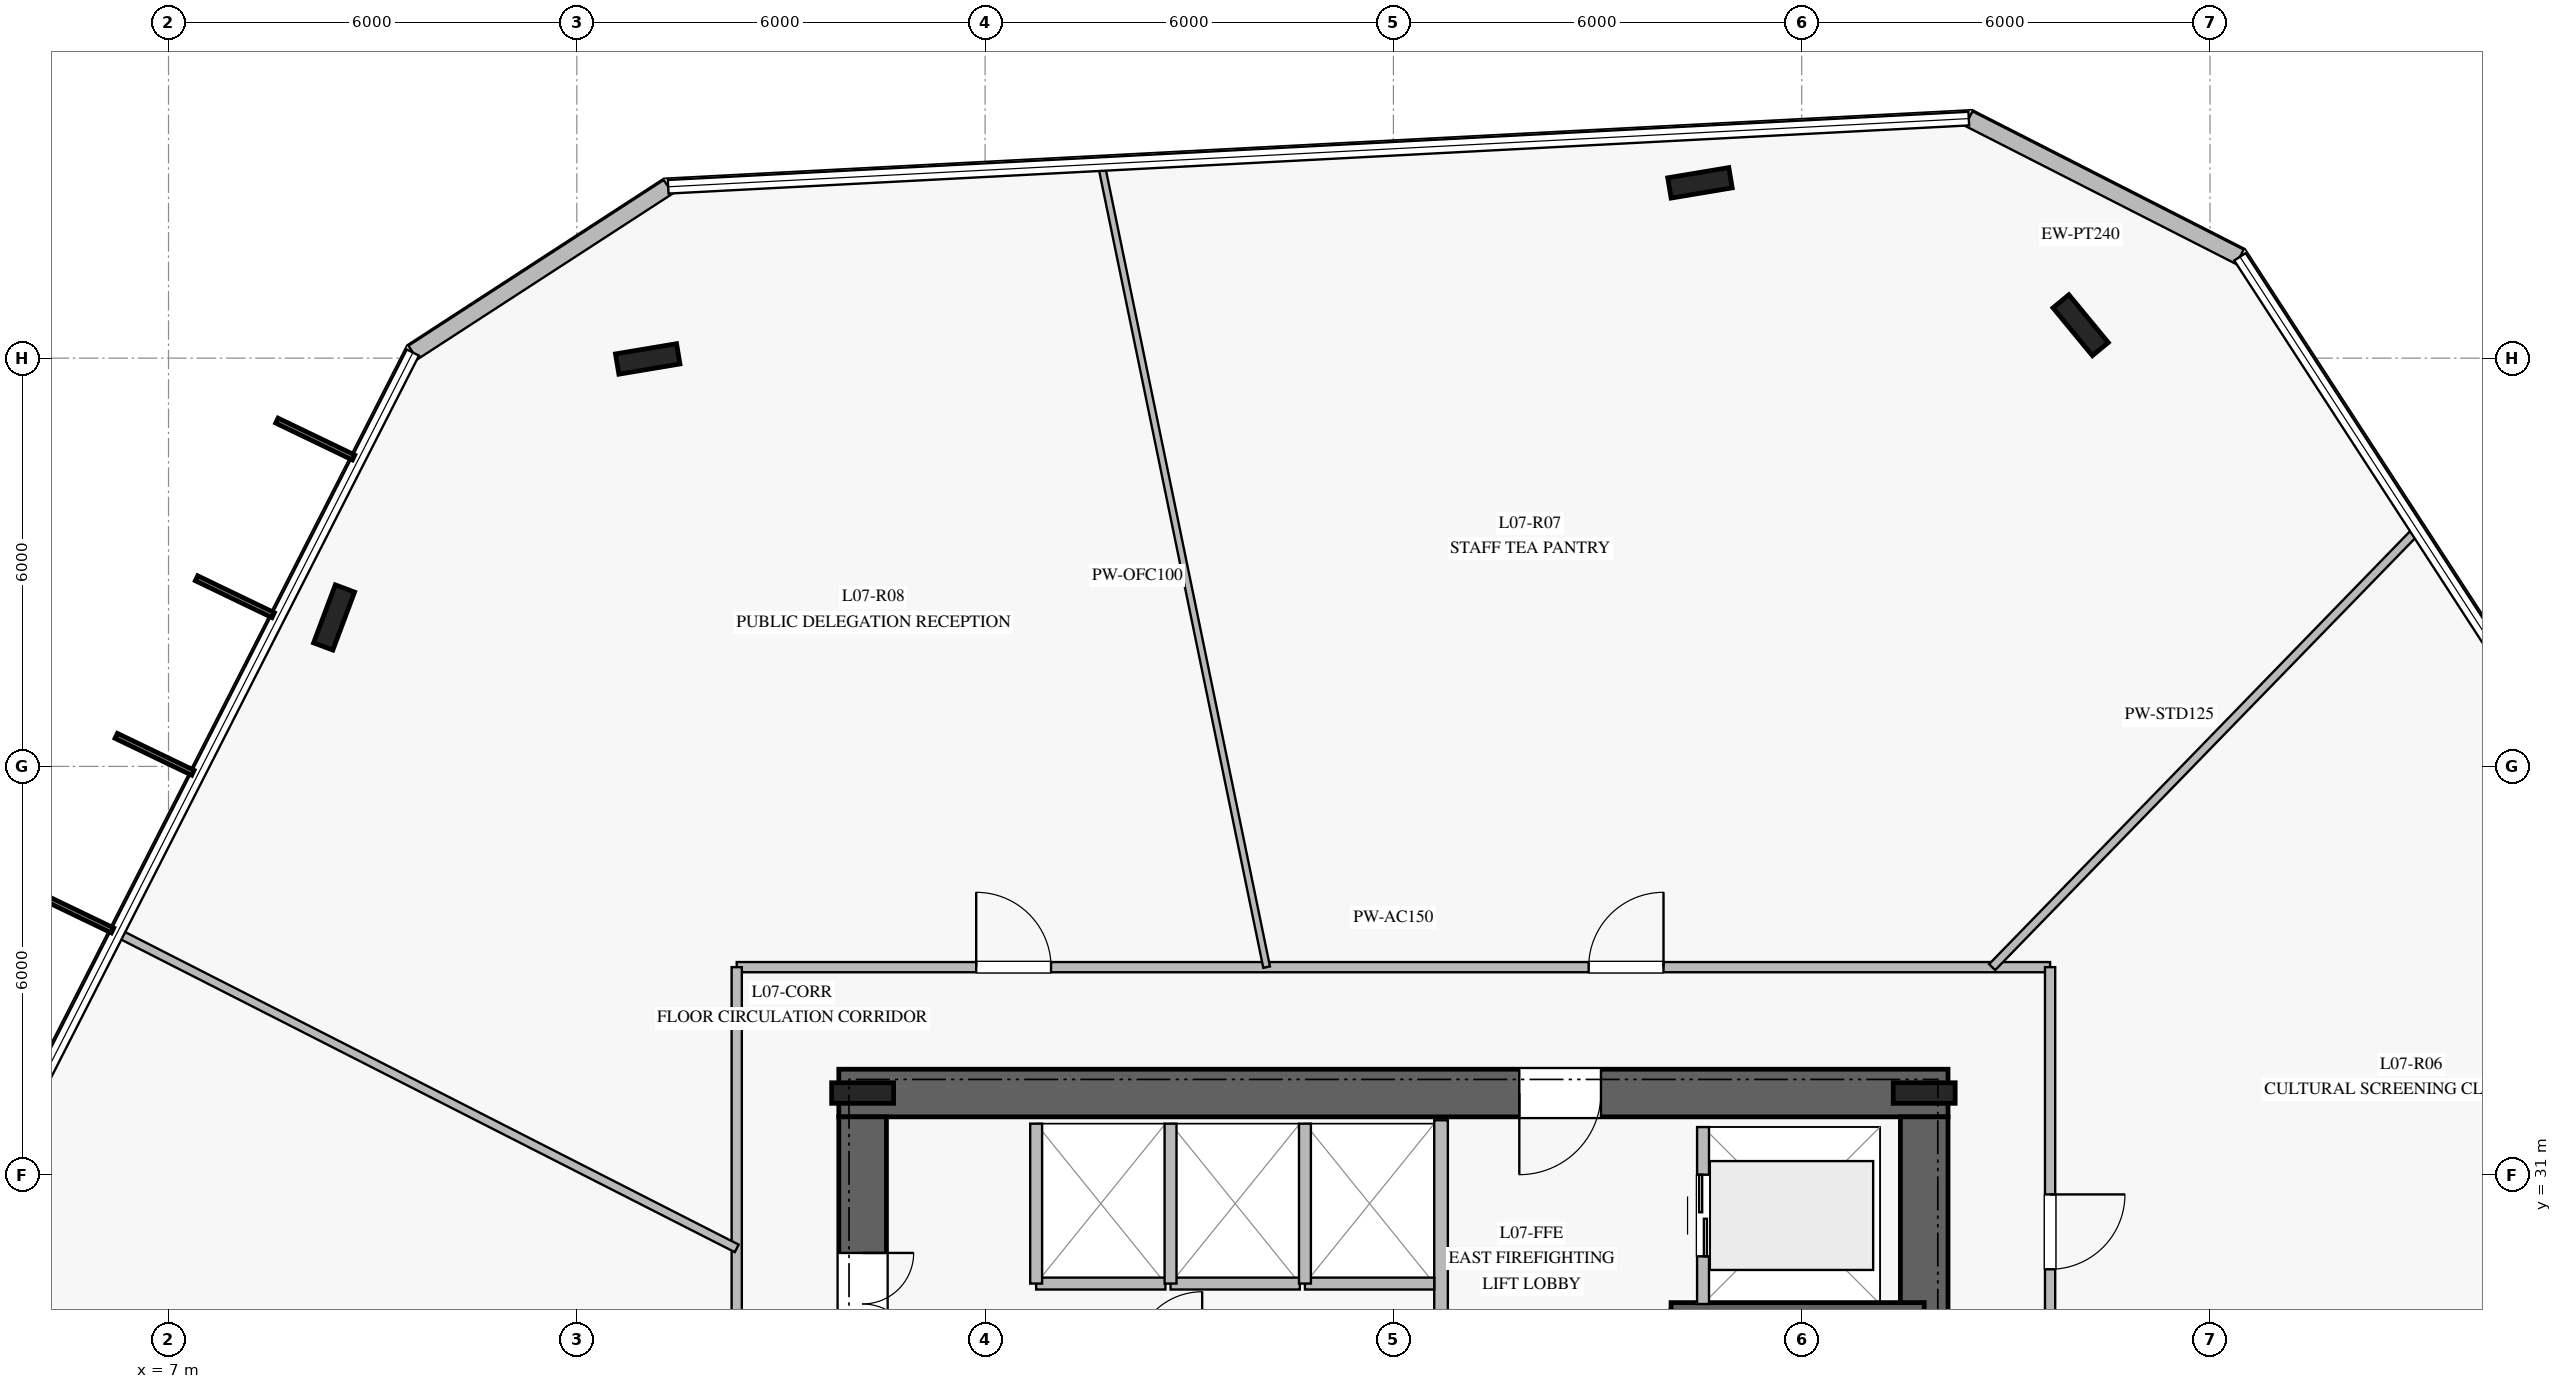
"""IFC4 building model, lengths in metres.
Left out: names, types, materials, properties, quantities, classifications, styles, units other than length and angle.
Written with IfcOpenShell. Run it as: python <this file> out.ifc"""

import sys

from ifc_helpers import new_model, si_unit, direction, frame, frame_2d, origin, origin_2d, place, context, subcontext, project, spatial, rectangle, i_section, extrude, element, fill, save


model = new_model("IFC4")
c1 = context("Model", 3, precision=1e-05, world=origin(), true_north=direction((0.0, 1.0)))
c2 = subcontext(c1, "Body", "Model", "MODEL_VIEW")
j1 = project(units=[si_unit("LENGTHUNIT", "METRE"), si_unit("PLANEANGLEUNIT", "RADIAN")], contexts=[c1])
p1 = place(None, origin())
s1 = spatial("IfcSite", under=j1, at=p1, CompositionType="ELEMENT")
p2 = place(p1, origin())
s2 = spatial("IfcBuilding", under=s1, at=p2, CompositionType="ELEMENT")
p3 = place(p2, frame((0.0, 0.0, 32.0)))
s3 = spatial("IfcBuildingStorey", under=s2, at=p3, CompositionType="ELEMENT", Elevation=32.0)
p4 = place(p3, frame((33.15, 32.2, 0.0), z_axis=(0.0, 0.0, 1.0), x_axis=(-1.0, 0.0, 0.0)))
e1 = element("IfcWall", 1, at=p4, inside=s3, PredefinedType="SHEAR", context=c2, shape_type="SweptSolid", body=[
    extrude(rectangle(XDim=16.3, YDim=0.7, at=frame_2d((8.15, 0.0))), origin(), (0.0, 0.0, 1.0), 3.76),
])
p5 = place(p4, frame((5.1, 0.0, 0.0)))
e2 = element("IfcOpeningElement", 2, at=p5, cuts=e1, PredefinedType="OPENING", context=c2, shape_type="SweptSolid", body=[
    extrude(rectangle(XDim=1.2, YDim=2.25, at=frame_2d((0.6, 1.125))), frame((0.0, 0.36, 0.0), z_axis=(0.0, -1.0, 0.0), x_axis=(1.0, 0.0, 0.0)), (0.0, 0.0, 1.0), 0.72),
])
p6 = place(p3, frame((17.2, 31.85, 0.0), z_axis=(0.0, 0.0, 1.0), x_axis=(0.0, -1.0, 0.0)))
e3 = element("IfcWall", 3, at=p6, inside=s3, PredefinedType="SHEAR", context=c2, shape_type="SweptSolid", body=[
    extrude(rectangle(XDim=13.7, YDim=0.7, at=frame_2d((6.85, 0.0))), origin(), (0.0, 0.0, 1.0), 3.76),
])
p7 = place(p6, frame((2.0, 0.0, 0.0)))
e4 = element("IfcOpeningElement", 4, at=p7, cuts=e3, PredefinedType="OPENING", context=c2, shape_type="SweptSolid", body=[
    extrude(rectangle(XDim=1.5, YDim=2.2, at=frame_2d((0.75, 1.1))), frame((0.0, 0.36, 0.0), z_axis=(0.0, -1.0, 0.0), x_axis=(1.0, 0.0, 0.0)), (0.0, 0.0, 1.0), 0.72),
])
p8 = place(p3, frame((32.8, 18.15, 0.0), z_axis=(0.0, 0.0, 1.0), x_axis=(0.0, 1.0, 0.0)))
e5 = element("IfcWall", 5, at=p8, inside=s3, PredefinedType="SHEAR", context=c2, shape_type="SweptSolid", body=[
    extrude(rectangle(XDim=13.7, YDim=0.7, at=frame_2d((6.85, 0.0))), origin(), (0.0, 0.0, 1.0), 3.76),
])
for number, where, z_axis, x_axis in (
    (6, (32.8, 32.2, 0.0), (0.0, 0.0, 1.0), (1.0, 0.0, 0.0)),
    (7, (17.2, 32.2, 0.0), (0.0, 0.0, 1.0), (1.0, 0.0, 0.0)),
):
    element("IfcColumn", number, at=place(p3, frame(where, z_axis=z_axis, x_axis=x_axis)), inside=s3, PredefinedType="COLUMN", context=c2, shape_type="SweptSolid", body=[
        extrude(i_section(OverallWidth=0.302, OverallDepth=0.91, WebThickness=0.021, FlangeThickness=0.04, at=origin_2d()), origin(), (0.0, 0.0, 1.0), 4.0),
    ])
p9 = place(p3, frame((29.08, 29.01, 0.0), z_axis=(0.0, 0.0, 1.0), x_axis=(1.0, 0.0, 0.0)))
e8 = element("IfcWall", 8, at=p9, inside=s3, PredefinedType="SOLIDWALL", context=c2, shape_type="SweptSolid", body=[
    extrude(rectangle(XDim=3.72, YDim=0.22, at=frame_2d((1.86, 0.0))), origin(), (0.0, 0.0, 1.0), 3.76),
])
for number, where, z_axis, x_axis in (
    (9, (35.099, 43.484, 0.0), (0.0, 0.0, 1.0), (-0.636, 0.772, 0.0)),
    (10, (29.505, 45.576, 0.0), (0.0, 0.0, 1.0), (0.986, 0.165, 0.0)),
    (11, (14.042, 42.988, 0.0), (0.0, 0.0, 1.0), (0.986, 0.165, 0.0)),
    (12, (9.433, 39.189, 0.0), (0.0, 0.0, 1.0), (0.35, 0.937, 0.0)),
):
    element("IfcColumn", number, at=place(p3, frame(where, z_axis=z_axis, x_axis=x_axis)), inside=s3, PredefinedType="COLUMN", context=c2, shape_type="SweptSolid", body=[
        extrude(i_section(OverallWidth=0.302, OverallDepth=0.91, WebThickness=0.021, FlangeThickness=0.04, at=origin_2d()), origin(), (0.0, 0.0, 1.0), 4.0),
    ])
p10 = place(p3, frame((37.44, 44.489, 0.0), z_axis=(0.0, 0.0, 1.0), x_axis=(-0.89095075078, 0.454099944599, 0.0)))
e13 = element("IfcWall", 13, at=p10, inside=s3, PredefinedType="STANDARD", context=c2, shape_type="SweptSolid", body=[
    extrude(rectangle(XDim=4.473, YDim=0.24, at=frame_2d((2.236, 0.0))), origin(), (0.0, 0.0, 1.0), 3.76),
])
p11 = place(p3, frame((14.343, 45.518, 0.0), z_axis=(0.0, 0.0, 1.0), x_axis=(-0.838722812153, -0.544558577542, 0.0)))
e14 = element("IfcWall", 14, at=p11, inside=s3, PredefinedType="STANDARD", context=c2, shape_type="SweptSolid", body=[
    extrude(rectangle(XDim=4.473, YDim=0.24, at=frame_2d((2.237, 0.0))), origin(), (0.0, 0.0, 1.0), 3.76),
])
p12 = place(p3, frame((25.7, 26.65, 0.0), z_axis=(0.0, 0.0, 1.0), x_axis=(0.0, 1.0, 0.0)))
e15 = element("IfcWall", 15, at=p12, inside=s3, PredefinedType="PARTITIONING", context=c2, shape_type="SweptSolid", body=[
    extrude(rectangle(XDim=5.15, YDim=0.2, at=frame_2d((2.575, 0.0))), origin(), (0.0, 0.0, 1.0), 3.76),
])
p13 = place(p3, frame((19.75, 29.4, 0.0), z_axis=(0.0, 0.0, 1.0), x_axis=(1.0, 0.0, 0.0)))
e16 = element("IfcWall", 16, at=p13, inside=s3, PredefinedType="PARTITIONING", context=c2, shape_type="SweptSolid", body=[
    extrude(rectangle(XDim=1.9, YDim=0.175, at=frame_2d((0.95, 0.0))), origin(), (0.0, 0.0, 1.0), 3.76),
])
p14 = place(p3, frame((19.75, 29.4, 0.0), z_axis=(0.0, 0.0, 1.0), x_axis=(0.0, 1.0, 0.0)))
e17 = element("IfcWall", 17, at=p14, inside=s3, PredefinedType="PARTITIONING", context=c2, shape_type="SweptSolid", body=[
    extrude(rectangle(XDim=2.35, YDim=0.175, at=frame_2d((1.175, 0.0))), origin(), (0.0, 0.0, 1.0), 3.76),
])
p15 = place(p3, frame((21.725, 29.4, 0.0), z_axis=(0.0, 0.0, 1.0), x_axis=(1.0, 0.0, 0.0)))
e18 = element("IfcWall", 18, at=p15, inside=s3, PredefinedType="PARTITIONING", context=c2, shape_type="SweptSolid", body=[
    extrude(rectangle(XDim=1.9, YDim=0.175, at=frame_2d((0.95, 0.0))), origin(), (0.0, 0.0, 1.0), 3.76),
])
p16 = place(p3, frame((21.725, 29.4, 0.0), z_axis=(0.0, 0.0, 1.0), x_axis=(0.0, 1.0, 0.0)))
e19 = element("IfcWall", 19, at=p16, inside=s3, PredefinedType="PARTITIONING", context=c2, shape_type="SweptSolid", body=[
    extrude(rectangle(XDim=2.35, YDim=0.175, at=frame_2d((1.175, 0.0))), origin(), (0.0, 0.0, 1.0), 3.76),
])
p17 = place(p3, frame((23.7, 29.4, 0.0), z_axis=(0.0, 0.0, 1.0), x_axis=(1.0, 0.0, 0.0)))
e20 = element("IfcWall", 20, at=p17, inside=s3, PredefinedType="PARTITIONING", context=c2, shape_type="SweptSolid", body=[
    extrude(rectangle(XDim=1.9, YDim=0.175, at=frame_2d((0.95, 0.0))), origin(), (0.0, 0.0, 1.0), 3.76),
])
p18 = place(p3, frame((23.7, 29.4, 0.0), z_axis=(0.0, 0.0, 1.0), x_axis=(0.0, 1.0, 0.0)))
e21 = element("IfcWall", 21, at=p18, inside=s3, PredefinedType="PARTITIONING", context=c2, shape_type="SweptSolid", body=[
    extrude(rectangle(XDim=2.35, YDim=0.175, at=frame_2d((1.175, 0.0))), origin(), (0.0, 0.0, 1.0), 3.76),
])
p19 = place(p3, frame((29.55, 29.1, 0.0), z_axis=(0.0, 0.0, 1.0), x_axis=(0.0, 1.0, 0.0)))
e22 = element("IfcWall", 22, at=p19, inside=s3, PredefinedType="PARTITIONING", context=c2, shape_type="SweptSolid", body=[
    extrude(rectangle(XDim=2.6, YDim=0.175, at=frame_2d((1.3, 0.0))), origin(), (0.0, 0.0, 1.0), 3.76),
])
p20 = place(p19, frame((0.7, 0.0, 0.0)))
e23 = element("IfcOpeningElement", 23, at=p20, cuts=e22, PredefinedType="OPENING", context=c2, shape_type="SweptSolid", body=[
    extrude(rectangle(XDim=1.2, YDim=2.2, at=frame_2d((0.6, 1.1))), frame((0.0, 0.098, 0.0), z_axis=(0.0, -1.0, 0.0), x_axis=(1.0, 0.0, 0.0)), (0.0, 0.0, 1.0), 0.195),
])
p21 = place(p3, frame((15.35, 34.05, 0.0), z_axis=(0.0, 0.0, 1.0), x_axis=(1.0, 0.0, 0.0)))
e24 = element("IfcWall", 24, at=p21, inside=s3, PredefinedType="PARTITIONING", context=c2, shape_type="SweptSolid", body=[
    extrude(rectangle(XDim=19.3, YDim=0.15, at=frame_2d((9.65, 0.0))), origin(), (0.0, 0.0, 1.0), 3.21),
])
p22 = place(p21, frame((12.519, 0.0, 0.0)))
e25 = element("IfcOpeningElement", 25, at=p22, cuts=e24, PredefinedType="OPENING", context=c2, shape_type="SweptSolid", body=[
    extrude(rectangle(XDim=1.1, YDim=2.2, at=frame_2d((0.55, 1.1))), frame((0.0, 0.085, 0.0), z_axis=(0.0, -1.0, 0.0), x_axis=(1.0, 0.0, 0.0)), (0.0, 0.0, 1.0), 0.17),
])
p23 = place(p21, frame((3.519, 0.0, 0.0)))
e26 = element("IfcOpeningElement", 26, at=p23, cuts=e24, PredefinedType="OPENING", context=c2, shape_type="SweptSolid", body=[
    extrude(rectangle(XDim=1.1, YDim=2.2, at=frame_2d((0.55, 1.1))), frame((0.0, 0.085, 0.0), z_axis=(0.0, -1.0, 0.0), x_axis=(1.0, 0.0, 0.0)), (0.0, 0.0, 1.0), 0.17),
])
p24 = place(p3, frame((34.65, 34.05, 0.0), z_axis=(0.0, 0.0, 1.0), x_axis=(0.0, -1.0, 0.0)))
e27 = element("IfcWall", 27, at=p24, inside=s3, PredefinedType="PARTITIONING", context=c2, shape_type="SweptSolid", body=[
    extrude(rectangle(XDim=18.1, YDim=0.15, at=frame_2d((9.05, 0.0))), origin(), (0.0, 0.0, 1.0), 3.21),
])
p25 = place(p24, frame((11.827, 0.0, 0.0)))
e28 = element("IfcOpeningElement", 28, at=p25, cuts=e27, PredefinedType="OPENING", context=c2, shape_type="SweptSolid", body=[
    extrude(rectangle(XDim=1.1, YDim=2.2, at=frame_2d((0.55, 1.1))), frame((0.0, 0.085, 0.0), z_axis=(0.0, -1.0, 0.0), x_axis=(1.0, 0.0, 0.0)), (0.0, 0.0, 1.0), 0.17),
])
p26 = place(p24, frame((3.34, 0.0, 0.0)))
e29 = element("IfcOpeningElement", 29, at=p26, cuts=e27, PredefinedType="OPENING", context=c2, shape_type="SweptSolid", body=[
    extrude(rectangle(XDim=1.1, YDim=2.2, at=frame_2d((0.55, 1.1))), frame((0.0, 0.085, 0.0), z_axis=(0.0, -1.0, 0.0), x_axis=(1.0, 0.0, 0.0)), (0.0, 0.0, 1.0), 0.17),
])
p27 = place(p3, frame((15.35, 15.95, 0.0), z_axis=(0.0, 0.0, 1.0), x_axis=(0.0, 1.0, 0.0)))
e30 = element("IfcWall", 30, at=p27, inside=s3, PredefinedType="PARTITIONING", context=c2, shape_type="SweptSolid", body=[
    extrude(rectangle(XDim=18.1, YDim=0.15, at=frame_2d((9.05, 0.0))), origin(), (0.0, 0.0, 1.0), 3.21),
])
p28 = place(p27, frame((8.687, 0.0, 0.0)))
e31 = element("IfcOpeningElement", 31, at=p28, cuts=e30, PredefinedType="OPENING", context=c2, shape_type="SweptSolid", body=[
    extrude(rectangle(XDim=1.1, YDim=2.2, at=frame_2d((0.55, 1.1))), frame((0.0, 0.085, 0.0), z_axis=(0.0, -1.0, 0.0), x_axis=(1.0, 0.0, 0.0)), (0.0, 0.0, 1.0), 0.17),
])
p29 = place(p3, frame((33.798, 34.05, 0.0), z_axis=(0.0, 0.0, 1.0), x_axis=(0.697087358393, 0.716986202635, 0.0)))
e32 = element("IfcWall", 32, at=p29, inside=s3, PredefinedType="PARTITIONING", context=c2, shape_type="SweptSolid", body=[
    extrude(rectangle(XDim=8.944, YDim=0.125, at=frame_2d((4.472, 0.0))), origin(), (0.0, 0.0, 1.0), 3.05),
])
p30 = place(p3, frame((23.137, 34.05, 0.0), z_axis=(0.0, 0.0, 1.0), x_axis=(-0.201724490036, 0.979442305662, 0.0)))
e33 = element("IfcWall", 33, at=p30, inside=s3, PredefinedType="MOVABLE", context=c2, shape_type="SweptSolid", body=[
    extrude(rectangle(XDim=12.031, YDim=0.1, at=frame_2d((6.016, 0.0))), origin(), (0.0, 0.0, 1.0), 3.06),
])
p31 = place(p3, frame((15.35, 29.917, 0.0), z_axis=(0.0, 0.0, 1.0), x_axis=(-0.891026709761, 0.453950881145, 0.0)))
e34 = element("IfcWall", 34, at=p31, inside=s3, PredefinedType="PARTITIONING", context=c2, shape_type="SweptSolid", body=[
    extrude(rectangle(XDim=10.2, YDim=0.125, at=frame_2d((5.1, 0.0))), origin(), (0.0, 0.0, 1.0), 3.02),
])
p32 = place(p5, origin())
e35 = element("IfcDoor", 35, at=p32, inside=s3, OperationType="SINGLE_SWING_RIGHT", PredefinedType="DOOR", context=c2, shape_type="SweptSolid", body=[
    extrude(rectangle(XDim=1.2, YDim=2.25, at=frame_2d((0.6, 1.125))), frame((0.0, 0.025, 0.0), z_axis=(0.0, -1.0, 0.0), x_axis=(1.0, 0.0, 0.0)), (0.0, 0.0, 1.0), 0.05),
])
fill(e2, e35)
p33 = place(p7, origin())
e36 = element("IfcDoor", 36, at=p33, inside=s3, OperationType="DOUBLE_DOOR_SINGLE_SWING", PredefinedType="DOOR", context=c2, shape_type="SweptSolid", body=[
    extrude(rectangle(XDim=1.5, YDim=2.2, at=frame_2d((0.75, 1.1))), frame((0.0, 0.025, 0.0), z_axis=(0.0, -1.0, 0.0), x_axis=(1.0, 0.0, 0.0)), (0.0, 0.0, 1.0), 0.05),
])
fill(e4, e36)
p34 = place(p20, origin())
e37 = element("IfcDoor", 37, at=p34, inside=s3, OperationType="DOUBLE_DOOR_SLIDING", PredefinedType="DOOR", context=c2, shape_type="SweptSolid", body=[
    extrude(rectangle(XDim=1.2, YDim=2.2, at=frame_2d((0.6, 1.1))), frame((0.0, 0.025, 0.0), z_axis=(0.0, -1.0, 0.0), x_axis=(1.0, 0.0, 0.0)), (0.0, 0.0, 1.0), 0.05),
])
fill(e23, e37)
p35 = place(p26, origin())
e38 = element("IfcDoor", 38, at=p35, inside=s3, OperationType="SINGLE_SWING_LEFT", PredefinedType="DOOR", context=c2, shape_type="SweptSolid", body=[
    extrude(rectangle(XDim=1.1, YDim=2.2, at=frame_2d((0.55, 1.1))), frame((0.0, 0.025, 0.0), z_axis=(0.0, -1.0, 0.0), x_axis=(1.0, 0.0, 0.0)), (0.0, 0.0, 1.0), 0.05),
])
fill(e29, e38)
p36 = place(p22, origin())
e39 = element("IfcDoor", 39, at=p36, inside=s3, OperationType="SINGLE_SWING_RIGHT", PredefinedType="DOOR", context=c2, shape_type="SweptSolid", body=[
    extrude(rectangle(XDim=1.1, YDim=2.2, at=frame_2d((0.55, 1.1))), frame((0.0, 0.025, 0.0), z_axis=(0.0, -1.0, 0.0), x_axis=(1.0, 0.0, 0.0)), (0.0, 0.0, 1.0), 0.05),
])
fill(e25, e39)
p37 = place(p23, origin())
e40 = element("IfcDoor", 40, at=p37, inside=s3, OperationType="SINGLE_SWING_LEFT", PredefinedType="DOOR", context=c2, shape_type="SweptSolid", body=[
    extrude(rectangle(XDim=1.1, YDim=2.2, at=frame_2d((0.55, 1.1))), frame((0.0, 0.025, 0.0), z_axis=(0.0, -1.0, 0.0), x_axis=(1.0, 0.0, 0.0)), (0.0, 0.0, 1.0), 0.05),
])
fill(e26, e40)
save(model, sys.argv[1])
